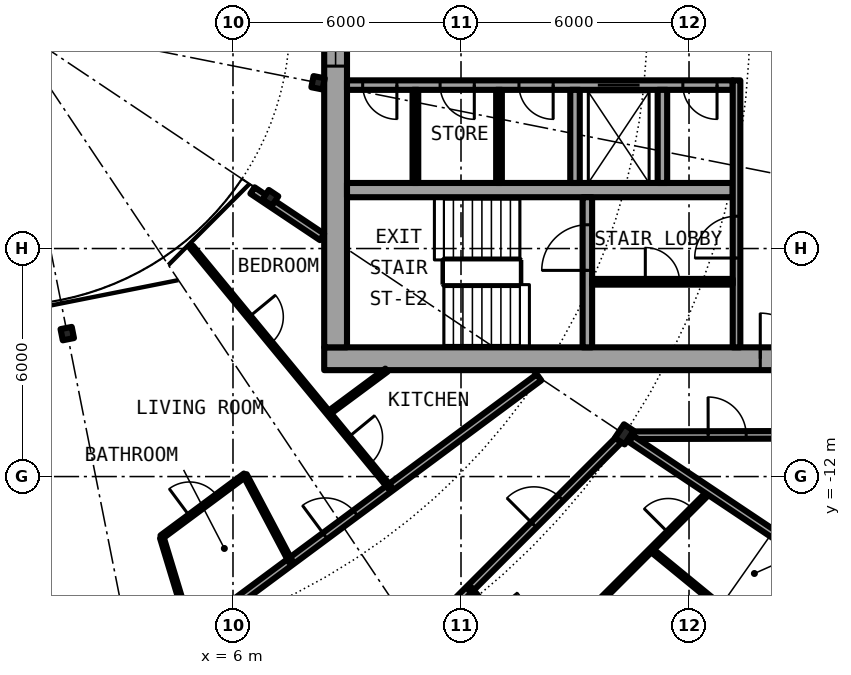
"""IFC4 building model, lengths in metres.
Left out: names, types, materials, properties, quantities, classifications, styles, units other than length and angle.
Written with IfcOpenShell. Run it as: python <this file> out.ifc"""

import sys

from ifc_helpers import new_model, si_unit, direction, frame, frame_2d, origin, origin_2d, place, context, subcontext, project, spatial, rectangle, i_section, extrude, element, fill, save


model = new_model("IFC4")
c1 = context("Model", 3, precision=1e-05, world=origin(), true_north=direction((0.0, 1.0)))
c2 = subcontext(c1, "Body", "Model", "MODEL_VIEW")
j1 = project(units=[si_unit("LENGTHUNIT", "METRE"), si_unit("PLANEANGLEUNIT", "RADIAN")], contexts=[c1])
p1 = place(None, origin())
s1 = spatial("IfcSite", under=j1, at=p1, CompositionType="ELEMENT")
p2 = place(p1, origin())
s2 = spatial("IfcBuilding", under=s1, at=p2, CompositionType="ELEMENT")
p3 = place(p2, frame((0.0, 0.0, 120.8)))
s3 = spatial("IfcBuildingStorey", under=s2, at=p3, CompositionType="ELEMENT", Elevation=120.8)
p4 = place(p3, frame((16.297, -10.889, 0.0), z_axis=(0.0, 0.0, 1.0), x_axis=(0.831469612303, -0.55557023302, 0.0)))
e1 = element("IfcColumn", 1, at=p4, inside=s3, PredefinedType="COLUMN", context=c2, shape_type="SweptSolid", body=[
    extrude(i_section(OverallWidth=0.307, OverallDepth=0.432, WebThickness=0.021, FlangeThickness=0.04, FilletRadius=0.027, at=origin_2d()), origin(), (0.0, 0.0, 1.0), 3.05),
])
for number, where, z_axis, x_axis in (
    (2, (1.639, -8.239, 0.0), (0.0, 0.0, 1.0), (0.195, -0.981, 0.0)),
    (3, (6.984, -4.667, 0.0), (0.0, 0.0, 1.0), (0.831, -0.556, 0.0)),
    (4, (8.239, -1.639, 0.0), (0.0, 0.0, 1.0), (0.981, -0.195, 0.0)),
):
    element("IfcColumn", number, at=place(p3, frame(where, z_axis=z_axis, x_axis=x_axis)), inside=s3, PredefinedType="COLUMN", context=c2, shape_type="SweptSolid", body=[
        extrude(i_section(OverallWidth=0.3, OverallDepth=0.3, WebThickness=0.011, FlangeThickness=0.019, FilletRadius=0.027, at=origin_2d()), origin(), (0.0, 0.0, 1.0), 3.05),
    ])
p5 = place(p3, frame((19.304, -19.304, 0.0), z_axis=(0.0, 0.0, 1.0), x_axis=(0.634382322723, 0.773019449054, 0.0)))
e5 = element("IfcWall", 5, at=p5, inside=s3, PredefinedType="SOLIDWALL", context=c2, shape_type="SweptSolid", body=[
    extrude(rectangle(XDim=5.352, YDim=0.25, at=frame_2d((2.676, 0.0))), origin(), (0.0, 0.0, 1.0), 2.7),
])
p6 = place(p5, frame((0.841, 0.0, 0.0)))
e6 = element("IfcOpeningElement", 6, at=p6, cuts=e5, PredefinedType="OPENING", context=c2, shape_type="SweptSolid", body=[
    extrude(rectangle(XDim=1.0, YDim=2.2, at=frame_2d((0.5, 1.1))), frame((0.0, 0.135, 0.0), z_axis=(0.0, -1.0, 0.0), x_axis=(1.0, 0.0, 0.0)), (0.0, 0.0, 1.0), 0.27),
])
p7 = place(p5, frame((3.111, 0.0, 0.3)))
e7 = element("IfcOpeningElement", 7, at=p7, cuts=e5, PredefinedType="OPENING", context=c2, shape_type="SweptSolid", body=[
    extrude(rectangle(XDim=1.8, YDim=2.1, at=frame_2d((0.9, 1.05))), frame((0.0, 0.135, 0.0), z_axis=(0.0, -1.0, 0.0), x_axis=(1.0, 0.0, 0.0)), (0.0, 0.0, 1.0), 0.27),
])
p8 = place(p3, frame((8.4, -8.9, 0.0), z_axis=(0.0, 0.0, 1.0), x_axis=(1.0, 0.0, 0.0)))
e8 = element("IfcWall", 8, at=p8, inside=s3, PredefinedType="SHEAR", context=c2, shape_type="SweptSolid", body=[
    extrude(rectangle(XDim=13.8, YDim=0.6, at=frame_2d((6.9, 0.0))), origin(), (0.0, 0.0, 1.0), 3.05),
])
p9 = place(p8, frame((11.475, 0.0, 0.0)))
e9 = element("IfcOpeningElement", 9, at=p9, cuts=e8, PredefinedType="OPENING", context=c2, shape_type="SweptSolid", body=[
    extrude(rectangle(XDim=1.2, YDim=2.3, at=frame_2d((0.6, 1.15))), frame((0.0, 0.31, 0.0), z_axis=(0.0, -1.0, 0.0), x_axis=(1.0, 0.0, 0.0)), (0.0, 0.0, 1.0), 0.62),
])
p10 = place(p3, frame((8.7, -8.6, 0.0), z_axis=(0.0, 0.0, 1.0), x_axis=(0.0, 1.0, 0.0)))
e10 = element("IfcWall", 10, at=p10, inside=s3, PredefinedType="SHEAR", context=c2, shape_type="SweptSolid", body=[
    extrude(rectangle(XDim=17.2, YDim=0.6, at=frame_2d((8.6, 0.0))), origin(), (0.0, 0.0, 1.0), 3.05),
])
p11 = place(p10, frame((7.4, 0.0, 0.1)))
e11 = element("IfcOpeningElement", 11, at=p11, cuts=e10, PredefinedType="OPENING", context=c2, shape_type="SweptSolid", body=[
    extrude(rectangle(XDim=2.4, YDim=2.2, at=frame_2d((1.2, 1.1))), frame((0.0, 0.31, 0.0), z_axis=(0.0, -1.0, 0.0), x_axis=(1.0, 0.0, 0.0)), (0.0, 0.0, 1.0), 0.62),
])
p12 = place(p3, frame((19.15, -1.7, 0.0), z_axis=(0.0, 0.0, 1.0), x_axis=(-1.0, 0.0, 0.0)))
e12 = element("IfcWall", 12, at=p12, inside=s3, PredefinedType="SHEAR", context=c2, shape_type="SweptSolid", body=[
    extrude(rectangle(XDim=10.15, YDim=0.25, at=frame_2d((5.075, 0.0))), origin(), (0.0, 0.0, 1.0), 3.05),
])
p13 = place(p12, frame((2.45, 0.0, 0.0)))
e13 = element("IfcOpeningElement", 13, at=p13, cuts=e12, PredefinedType="OPENING", context=c2, shape_type="SweptSolid", body=[
    extrude(rectangle(XDim=1.1, YDim=2.3, at=frame_2d((0.55, 1.15))), frame((0.0, 0.135, 0.0), z_axis=(0.0, -1.0, 0.0), x_axis=(1.0, 0.0, 0.0)), (0.0, 0.0, 1.0), 0.27),
])
p14 = place(p12, frame((8.837, 0.0, 0.0)))
e14 = element("IfcOpeningElement", 14, at=p14, cuts=e12, PredefinedType="OPENING", context=c2, shape_type="SweptSolid", body=[
    extrude(rectangle(XDim=0.9, YDim=2.3, at=frame_2d((0.45, 1.15))), frame((0.0, 0.135, 0.0), z_axis=(0.0, -1.0, 0.0), x_axis=(1.0, 0.0, 0.0)), (0.0, 0.0, 1.0), 0.27),
])
p15 = place(p12, frame((6.8, 0.0, 0.0)))
e15 = element("IfcOpeningElement", 15, at=p15, cuts=e12, PredefinedType="OPENING", context=c2, shape_type="SweptSolid", body=[
    extrude(rectangle(XDim=0.9, YDim=2.3, at=frame_2d((0.45, 1.15))), frame((0.0, 0.135, 0.0), z_axis=(0.0, -1.0, 0.0), x_axis=(1.0, 0.0, 0.0)), (0.0, 0.0, 1.0), 0.27),
])
p16 = place(p12, frame((4.725, 0.0, 0.0)))
e16 = element("IfcOpeningElement", 16, at=p16, cuts=e12, PredefinedType="OPENING", context=c2, shape_type="SweptSolid", body=[
    extrude(rectangle(XDim=0.9, YDim=2.3, at=frame_2d((0.45, 1.15))), frame((0.0, 0.135, 0.0), z_axis=(0.0, -1.0, 0.0), x_axis=(1.0, 0.0, 0.0)), (0.0, 0.0, 1.0), 0.27),
])
p17 = place(p12, frame((0.413, 0.0, 0.0)))
e17 = element("IfcOpeningElement", 17, at=p17, cuts=e12, PredefinedType="OPENING", context=c2, shape_type="SweptSolid", body=[
    extrude(rectangle(XDim=0.9, YDim=2.3, at=frame_2d((0.45, 1.15))), frame((0.0, 0.135, 0.0), z_axis=(0.0, -1.0, 0.0), x_axis=(1.0, 0.0, 0.0)), (0.0, 0.0, 1.0), 0.27),
])
p18 = place(p3, frame((9.0, -4.462, 0.0), z_axis=(0.0, 0.0, 1.0), x_axis=(1.0, 0.0, 0.0)))
e18 = element("IfcWall", 18, at=p18, inside=s3, PredefinedType="SHEAR", context=c2, shape_type="SweptSolid", body=[
    extrude(rectangle(XDim=10.15, YDim=0.375, at=frame_2d((5.075, 0.0))), origin(), (0.0, 0.0, 1.0), 3.05),
])
p19 = place(p3, frame((15.325, -8.6, 0.0), z_axis=(0.0, 0.0, 1.0), x_axis=(0.0, 1.0, 0.0)))
e19 = element("IfcWall", 19, at=p19, inside=s3, PredefinedType="SHEAR", context=c2, shape_type="SweptSolid", body=[
    extrude(rectangle(XDim=3.95, YDim=0.25, at=frame_2d((1.975, 0.0))), origin(), (0.0, 0.0, 1.0), 3.05),
])
p20 = place(p19, frame((2.025, 0.0, 0.0)))
e20 = element("IfcOpeningElement", 20, at=p20, cuts=e19, PredefinedType="OPENING", context=c2, shape_type="SweptSolid", body=[
    extrude(rectangle(XDim=1.2, YDim=2.3, at=frame_2d((0.6, 1.15))), frame((0.0, 0.135, 0.0), z_axis=(0.0, -1.0, 0.0), x_axis=(1.0, 0.0, 0.0)), (0.0, 0.0, 1.0), 0.27),
])
for number, where, z_axis, x_axis in (
    (21, (15.0, -1.825, 0.0), (0.0, 0.0, 1.0), (0.0, -1.0, 0.0)),
    (22, (17.3, -1.825, 0.0), (0.0, 0.0, 1.0), (0.0, -1.0, 0.0)),
):
    element("IfcWall", number, at=place(p3, frame(where, z_axis=z_axis, x_axis=x_axis)), inside=s3, PredefinedType="SOLIDWALL", context=c2, shape_type="SweptSolid", body=[
        extrude(rectangle(XDim=2.45, YDim=0.25, at=frame_2d((1.225, 0.0))), origin(), (0.0, 0.0, 1.0), 2.7),
    ])
p21 = place(p3, frame((19.25, -8.6, 0.0), z_axis=(0.0, 0.0, 1.0), x_axis=(0.0, 1.0, 0.0)))
e23 = element("IfcWall", 23, at=p21, inside=s3, PredefinedType="SOLIDWALL", context=c2, shape_type="SweptSolid", body=[
    extrude(rectangle(XDim=7.025, YDim=0.2, at=frame_2d((3.513, 0.0))), origin(), (0.0, 0.0, 1.0), 2.7),
])
p22 = place(p21, frame((2.35, 0.0, 0.0)))
e24 = element("IfcOpeningElement", 24, at=p22, cuts=e23, PredefinedType="OPENING", context=c2, shape_type="SweptSolid", body=[
    extrude(rectangle(XDim=1.1, YDim=2.3, at=frame_2d((0.55, 1.15))), frame((0.0, 0.11, 0.0), z_axis=(0.0, -1.0, 0.0), x_axis=(1.0, 0.0, 0.0)), (0.0, 0.0, 1.0), 0.22),
])
for number, where, z_axis, x_axis in (
    (25, (10.8, -1.825, 0.0), (0.0, 0.0, 1.0), (0.0, -1.0, 0.0)),
    (26, (13.0, -1.825, 0.0), (0.0, 0.0, 1.0), (0.0, -1.0, 0.0)),
):
    element("IfcWall", number, at=place(p3, frame(where, z_axis=z_axis, x_axis=x_axis)), inside=s3, PredefinedType="PARTITIONING", context=c2, shape_type="SweptSolid", body=[
        extrude(rectangle(XDim=2.45, YDim=0.15, at=frame_2d((1.225, 0.0))), origin(), (0.0, 0.0, 1.0), 2.7),
    ])
p23 = place(p3, frame((15.45, -6.875, 0.0), z_axis=(0.0, 0.0, 1.0), x_axis=(1.0, 0.0, 0.0)))
e27 = element("IfcWall", 27, at=p23, inside=s3, PredefinedType="PARTITIONING", context=c2, shape_type="SweptSolid", body=[
    extrude(rectangle(XDim=3.7, YDim=0.15, at=frame_2d((1.85, 0.0))), origin(), (0.0, 0.0, 1.0), 2.7),
])
p24 = place(p23, frame((1.4, 0.0, 0.0)))
e28 = element("IfcOpeningElement", 28, at=p24, cuts=e27, PredefinedType="OPENING", context=c2, shape_type="SweptSolid", body=[
    extrude(rectangle(XDim=0.9, YDim=2.3, at=frame_2d((0.45, 1.15))), frame((0.0, 0.085, 0.0), z_axis=(0.0, -1.0, 0.0), x_axis=(1.0, 0.0, 0.0)), (0.0, 0.0, 1.0), 0.17),
])
p25 = place(p3, frame((15.468, -15.463, 0.0), z_axis=(0.0, 0.0, 1.0), x_axis=(0.707106781187, 0.707106781187, 0.0)))
e29 = element("IfcWall", 29, at=p25, inside=s3, PredefinedType="PARTITIONING", context=c2, shape_type="SweptSolid", body=[
    extrude(rectangle(XDim=4.351, YDim=0.1, at=frame_2d((2.176, 0.0))), origin(), (0.0, 0.0, 1.0), 2.7),
])
p26 = place(p25, frame((2.808, 0.0, 0.0)))
e30 = element("IfcOpeningElement", 30, at=p26, cuts=e29, PredefinedType="OPENING", context=c2, shape_type="SweptSolid", body=[
    extrude(rectangle(XDim=0.9, YDim=2.3, at=frame_2d((0.45, 1.15))), frame((0.0, 0.06, 0.0), z_axis=(0.0, -1.0, 0.0), x_axis=(1.0, 0.0, 0.0)), (0.0, 0.0, 1.0), 0.12),
])
p27 = place(p3, frame((11.0, -16.186, 0.0), z_axis=(0.0, 0.0, 1.0), x_axis=(0.707106781187, 0.707106781187, 0.0)))
e31 = element("IfcWall", 31, at=p27, inside=s3, PredefinedType="PARTITIONING", context=c2, shape_type="SweptSolid", body=[
    extrude(rectangle(XDim=7.334, YDim=0.2, at=frame_2d((3.667, 0.0))), origin(), (0.0, 0.0, 1.0), 2.39),
])
p28 = place(p27, frame((4.123, 0.0, 0.0)))
e32 = element("IfcOpeningElement", 32, at=p28, cuts=e31, PredefinedType="OPENING", context=c2, shape_type="SweptSolid", body=[
    extrude(rectangle(XDim=1.0, YDim=2.3, at=frame_2d((0.5, 1.15))), frame((0.0, 0.11, 0.0), z_axis=(0.0, -1.0, 0.0), x_axis=(1.0, 0.0, 0.0)), (0.0, 0.0, 1.0), 0.22),
])
p29 = place(p3, frame((4.906, -16.172, 0.0), z_axis=(0.0, 0.0, 1.0), x_axis=(0.803204584823, 0.59570327758, 0.0)))
e33 = element("IfcWall", 33, at=p29, inside=s3, PredefinedType="PARTITIONING", context=c2, shape_type="SweptSolid", body=[
    extrude(rectangle(XDim=11.387, YDim=0.2, at=frame_2d((5.693, 0.0))), origin(), (0.0, 0.0, 1.0), 2.7),
])
p30 = place(p29, frame((4.38, 0.0, 0.0)))
e34 = element("IfcOpeningElement", 34, at=p30, cuts=e33, PredefinedType="OPENING", context=c2, shape_type="SweptSolid", body=[
    extrude(rectangle(XDim=1.0, YDim=2.3, at=frame_2d((0.5, 1.15))), frame((0.0, 0.11, 0.0), z_axis=(0.0, -1.0, 0.0), x_axis=(1.0, 0.0, 0.0)), (0.0, 0.0, 1.0), 0.22),
])
p31 = place(p3, frame((4.122, -13.589, 0.0), z_axis=(0.0, 0.0, 1.0), x_axis=(0.803128348509, 0.595806055542, 0.0)))
e35 = element("IfcWall", 35, at=p31, inside=s3, PredefinedType="PARTITIONING", context=c2, shape_type="SweptSolid", body=[
    extrude(rectangle(XDim=2.734, YDim=0.1, at=frame_2d((1.367, 0.0))), origin(), (0.0, 0.0, 1.0), 2.7),
])
p32 = place(p31, frame((0.917, 0.0, 0.0)))
e36 = element("IfcOpeningElement", 36, at=p32, cuts=e35, PredefinedType="OPENING", context=c2, shape_type="SweptSolid", body=[
    extrude(rectangle(XDim=0.9, YDim=2.3, at=frame_2d((0.45, 1.15))), frame((0.0, 0.06, 0.0), z_axis=(0.0, -1.0, 0.0), x_axis=(1.0, 0.0, 0.0)), (0.0, 0.0, 1.0), 0.12),
])
p33 = place(p3, frame((8.513, -10.332, 0.0), z_axis=(0.0, 0.0, 1.0), x_axis=(0.803149591038, 0.595777420196, 0.0)))
e37 = element("IfcWall", 37, at=p33, inside=s3, PredefinedType="PARTITIONING", context=c2, shape_type="SweptSolid", body=[
    extrude(rectangle(XDim=1.9, YDim=0.1, at=frame_2d((0.95, 0.0))), origin(), (0.0, 0.0, 1.0), 2.7),
])
p34 = place(p3, frame((16.541, -10.912, 0.0), z_axis=(0.0, 0.0, 1.0), x_axis=(0.999997173357, 0.002377662213, 0.0)))
e38 = element("IfcWall", 38, at=p34, inside=s3, PredefinedType="PARTITIONING", context=c2, shape_type="SweptSolid", body=[
    extrude(rectangle(XDim=5.134, YDim=0.2, at=frame_2d((2.567, 0.0))), origin(), (0.0, 0.0, 1.0), 2.7),
])
p35 = place(p34, frame((1.963, 0.0, 0.0)))
e39 = element("IfcOpeningElement", 39, at=p35, cuts=e38, PredefinedType="OPENING", context=c2, shape_type="SweptSolid", body=[
    extrude(rectangle(XDim=1.0, YDim=2.3, at=frame_2d((0.5, 1.15))), frame((0.0, 0.11, 0.0), z_axis=(0.0, -1.0, 0.0), x_axis=(1.0, 0.0, 0.0)), (0.0, 0.0, 1.0), 0.22),
])
p36 = place(p3, frame((6.513, -4.472, 0.0), z_axis=(0.0, 0.0, 1.0), x_axis=(0.831333375071, -0.555774072347, 0.0)))
e40 = element("IfcWall", 40, at=p36, inside=s3, PredefinedType="PARTITIONING", context=c2, shape_type="SweptSolid", body=[
    extrude(rectangle(XDim=2.203, YDim=0.2, at=frame_2d((1.101, 0.0))), origin(), (0.0, 0.0, 1.0), 2.7),
])
p37 = place(p3, frame((4.908, -5.959, 0.0), z_axis=(0.0, 0.0, 1.0), x_axis=(0.636105207978, -0.771602335652, 0.0)))
e41 = element("IfcWall", 41, at=p37, inside=s3, PredefinedType="PARTITIONING", context=c2, shape_type="SweptSolid", body=[
    extrude(rectangle(XDim=8.213, YDim=0.1, at=frame_2d((4.106, 0.0))), origin(), (0.0, 0.0, 1.0), 2.7),
])
p38 = place(p37, frame((6.49, 0.0, 0.0)))
e42 = element("IfcOpeningElement", 42, at=p38, cuts=e41, PredefinedType="OPENING", context=c2, shape_type="SweptSolid", body=[
    extrude(rectangle(XDim=0.9, YDim=2.3, at=frame_2d((0.45, 1.15))), frame((0.0, 0.06, 0.0), z_axis=(0.0, -1.0, 0.0), x_axis=(1.0, 0.0, 0.0)), (0.0, 0.0, 1.0), 0.12),
])
p39 = place(p37, frame((2.384, 0.0, 0.0)))
e43 = element("IfcOpeningElement", 43, at=p39, cuts=e41, PredefinedType="OPENING", context=c2, shape_type="SweptSolid", body=[
    extrude(rectangle(XDim=0.9, YDim=2.3, at=frame_2d((0.45, 1.15))), frame((0.0, 0.06, 0.0), z_axis=(0.0, -1.0, 0.0), x_axis=(1.0, 0.0, 0.0)), (0.0, 0.0, 1.0), 0.12),
])
p40 = place(p3, frame((6.316, -11.961, 0.0), z_axis=(0.0, 0.0, 1.0), x_axis=(0.467037016128, -0.884237765291, 0.0)))
e44 = element("IfcWall", 44, at=p40, inside=s3, PredefinedType="PARTITIONING", context=c2, shape_type="SweptSolid", body=[
    extrude(rectangle(XDim=2.572, YDim=0.1, at=frame_2d((1.286, 0.0))), origin(), (0.0, 0.0, 1.0), 2.7),
])
p41 = place(p3, frame((12.237, -14.948, 0.0), z_axis=(0.0, 0.0, 1.0), x_axis=(0.633537478353, -0.773712002958, 0.0)))
e45 = element("IfcWall", 45, at=p41, inside=s3, PredefinedType="PARTITIONING", context=c2, shape_type="SweptSolid", body=[
    extrude(rectangle(XDim=2.661, YDim=0.1, at=frame_2d((1.331, 0.0))), origin(), (0.0, 0.0, 1.0), 2.7),
])
p42 = place(p41, frame((0.881, 0.0, 0.0)))
e46 = element("IfcOpeningElement", 46, at=p42, cuts=e45, PredefinedType="OPENING", context=c2, shape_type="SweptSolid", body=[
    extrude(rectangle(XDim=0.9, YDim=2.3, at=frame_2d((0.45, 1.15))), frame((0.0, 0.06, 0.0), z_axis=(0.0, -1.0, 0.0), x_axis=(1.0, 0.0, 0.0)), (0.0, 0.0, 1.0), 0.12),
])
p43 = place(p3, frame((16.477, -11.009, 0.0), z_axis=(0.0, 0.0, 1.0), x_axis=(0.831467903109, -0.555572791, 0.0)))
e47 = element("IfcWall", 47, at=p43, inside=s3, PredefinedType="PARTITIONING", context=c2, shape_type="SweptSolid", body=[
    extrude(rectangle(XDim=7.358, YDim=0.2, at=frame_2d((3.679, 0.0))), origin(), (0.0, 0.0, 1.0), 2.7),
])
p44 = place(p3, frame((17.004, -13.927, 0.0), z_axis=(0.0, 0.0, 1.0), x_axis=(0.773517471898, -0.633774976367, 0.0)))
e48 = element("IfcWall", 48, at=p44, inside=s3, PredefinedType="PARTITIONING", context=c2, shape_type="SweptSolid", body=[
    extrude(rectangle(XDim=5.196, YDim=0.1, at=frame_2d((2.598, 0.0))), origin(), (0.0, 0.0, 1.0), 2.7),
])
p45 = place(p3, frame((4.9, -16.152, 0.0), z_axis=(0.0, 0.0, 1.0), x_axis=(-0.290456070925, 0.956888327269, 0.0)))
e49 = element("IfcWall", 49, at=p45, inside=s3, PredefinedType="PARTITIONING", context=c2, shape_type="SweptSolid", body=[
    extrude(rectangle(XDim=2.658, YDim=0.1, at=frame_2d((1.329, 0.0))), origin(), (0.0, 0.0, 1.0), 2.7),
])
p46 = place(p13, origin())
e50 = element("IfcDoor", 50, at=p46, inside=s3, OperationType="DOUBLE_DOOR_SLIDING", PredefinedType="DOOR", context=c2, shape_type="SweptSolid", body=[
    extrude(rectangle(XDim=1.1, YDim=2.3, at=frame_2d((0.55, 1.15))), frame((0.0, 0.025, 0.0), z_axis=(0.0, -1.0, 0.0), x_axis=(1.0, 0.0, 0.0)), (0.0, 0.0, 1.0), 0.05),
])
fill(e13, e50)
p47 = place(p14, origin())
e51 = element("IfcDoor", 51, at=p47, inside=s3, OperationType="SINGLE_SWING_LEFT", PredefinedType="DOOR", context=c2, shape_type="SweptSolid", body=[
    extrude(rectangle(XDim=0.9, YDim=2.3, at=frame_2d((0.45, 1.15))), frame((0.0, 0.025, 0.0), z_axis=(0.0, -1.0, 0.0), x_axis=(1.0, 0.0, 0.0)), (0.0, 0.0, 1.0), 0.05),
])
fill(e14, e51)
p48 = place(p15, origin())
e52 = element("IfcDoor", 52, at=p48, inside=s3, OperationType="SINGLE_SWING_LEFT", PredefinedType="DOOR", context=c2, shape_type="SweptSolid", body=[
    extrude(rectangle(XDim=0.9, YDim=2.3, at=frame_2d((0.45, 1.15))), frame((0.0, 0.025, 0.0), z_axis=(0.0, -1.0, 0.0), x_axis=(1.0, 0.0, 0.0)), (0.0, 0.0, 1.0), 0.05),
])
fill(e15, e52)
p49 = place(p16, origin())
e53 = element("IfcDoor", 53, at=p49, inside=s3, OperationType="SINGLE_SWING_LEFT", PredefinedType="DOOR", context=c2, shape_type="SweptSolid", body=[
    extrude(rectangle(XDim=0.9, YDim=2.3, at=frame_2d((0.45, 1.15))), frame((0.0, 0.025, 0.0), z_axis=(0.0, -1.0, 0.0), x_axis=(1.0, 0.0, 0.0)), (0.0, 0.0, 1.0), 0.05),
])
fill(e16, e53)
p50 = place(p17, origin())
e54 = element("IfcDoor", 54, at=p50, inside=s3, OperationType="SINGLE_SWING_RIGHT", PredefinedType="DOOR", context=c2, shape_type="SweptSolid", body=[
    extrude(rectangle(XDim=0.9, YDim=2.3, at=frame_2d((0.45, 1.15))), frame((0.0, 0.025, 0.0), z_axis=(0.0, -1.0, 0.0), x_axis=(1.0, 0.0, 0.0)), (0.0, 0.0, 1.0), 0.05),
])
fill(e17, e54)
p51 = place(p24, origin())
e55 = element("IfcDoor", 55, at=p51, inside=s3, OperationType="SINGLE_SWING_LEFT", PredefinedType="DOOR", context=c2, shape_type="SweptSolid", body=[
    extrude(rectangle(XDim=0.9, YDim=2.3, at=frame_2d((0.45, 1.15))), frame((0.0, 0.025, 0.0), z_axis=(0.0, -1.0, 0.0), x_axis=(1.0, 0.0, 0.0)), (0.0, 0.0, 1.0), 0.05),
])
fill(e28, e55)
p52 = place(p20, origin())
e56 = element("IfcDoor", 56, at=p52, inside=s3, OperationType="SINGLE_SWING_LEFT", PredefinedType="DOOR", context=c2, shape_type="SweptSolid", body=[
    extrude(rectangle(XDim=1.2, YDim=2.3, at=frame_2d((0.6, 1.15))), frame((0.0, 0.025, 0.0), z_axis=(0.0, -1.0, 0.0), x_axis=(1.0, 0.0, 0.0)), (0.0, 0.0, 1.0), 0.05),
])
fill(e20, e56)
p53 = place(p22, origin())
e57 = element("IfcDoor", 57, at=p53, inside=s3, OperationType="SINGLE_SWING_RIGHT", PredefinedType="DOOR", context=c2, shape_type="SweptSolid", body=[
    extrude(rectangle(XDim=1.1, YDim=2.3, at=frame_2d((0.55, 1.15))), frame((0.0, 0.025, 0.0), z_axis=(0.0, -1.0, 0.0), x_axis=(1.0, 0.0, 0.0)), (0.0, 0.0, 1.0), 0.05),
])
fill(e24, e57)
p54 = place(p9, origin())
e58 = element("IfcDoor", 58, at=p54, inside=s3, OperationType="SINGLE_SWING_LEFT", PredefinedType="DOOR", context=c2, shape_type="SweptSolid", body=[
    extrude(rectangle(XDim=1.2, YDim=2.3, at=frame_2d((0.6, 1.15))), frame((0.0, 0.025, 0.0), z_axis=(0.0, -1.0, 0.0), x_axis=(1.0, 0.0, 0.0)), (0.0, 0.0, 1.0), 0.05),
])
fill(e9, e58)
p55 = place(p11, origin())
e59 = element("IfcWindow", 59, at=p55, inside=s3, PartitioningType="SINGLE_PANEL", PredefinedType="WINDOW", context=c2, shape_type="SweptSolid", body=[
    extrude(rectangle(XDim=2.4, YDim=2.2, at=frame_2d((1.2, 1.1))), frame((0.0, 0.03, 0.0), z_axis=(0.0, -1.0, 0.0), x_axis=(1.0, 0.0, 0.0)), (0.0, 0.0, 1.0), 0.06),
])
fill(e11, e59)
p56 = place(p28, origin())
e60 = element("IfcDoor", 60, at=p56, inside=s3, OperationType="SINGLE_SWING_RIGHT", PredefinedType="DOOR", context=c2, shape_type="SweptSolid", body=[
    extrude(rectangle(XDim=1.0, YDim=2.3, at=frame_2d((0.5, 1.15))), frame((0.0, 0.025, 0.0), z_axis=(0.0, -1.0, 0.0), x_axis=(1.0, 0.0, 0.0)), (0.0, 0.0, 1.0), 0.05),
])
fill(e32, e60)
p57 = place(p26, origin())
e61 = element("IfcDoor", 61, at=p57, inside=s3, OperationType="SINGLE_SWING_RIGHT", PredefinedType="DOOR", context=c2, shape_type="SweptSolid", body=[
    extrude(rectangle(XDim=0.9, YDim=2.3, at=frame_2d((0.45, 1.15))), frame((0.0, 0.025, 0.0), z_axis=(0.0, -1.0, 0.0), x_axis=(1.0, 0.0, 0.0)), (0.0, 0.0, 1.0), 0.05),
])
fill(e30, e61)
p58 = place(p30, origin())
e62 = element("IfcDoor", 62, at=p58, inside=s3, OperationType="SINGLE_SWING_LEFT", PredefinedType="DOOR", context=c2, shape_type="SweptSolid", body=[
    extrude(rectangle(XDim=1.0, YDim=2.3, at=frame_2d((0.5, 1.15))), frame((0.0, 0.025, 0.0), z_axis=(0.0, -1.0, 0.0), x_axis=(1.0, 0.0, 0.0)), (0.0, 0.0, 1.0), 0.05),
])
fill(e34, e62)
p59 = place(p32, origin())
e63 = element("IfcDoor", 63, at=p59, inside=s3, OperationType="SINGLE_SWING_RIGHT", PredefinedType="DOOR", context=c2, shape_type="SweptSolid", body=[
    extrude(rectangle(XDim=0.9, YDim=2.3, at=frame_2d((0.45, 1.15))), frame((0.0, 0.025, 0.0), z_axis=(0.0, -1.0, 0.0), x_axis=(1.0, 0.0, 0.0)), (0.0, 0.0, 1.0), 0.05),
])
fill(e36, e63)
p60 = place(p38, origin())
e64 = element("IfcDoor", 64, at=p60, inside=s3, OperationType="SINGLE_SWING_RIGHT", PredefinedType="DOOR", context=c2, shape_type="SweptSolid", body=[
    extrude(rectangle(XDim=0.9, YDim=2.3, at=frame_2d((0.45, 1.15))), frame((0.0, 0.025, 0.0), z_axis=(0.0, -1.0, 0.0), x_axis=(1.0, 0.0, 0.0)), (0.0, 0.0, 1.0), 0.05),
])
fill(e42, e64)
p61 = place(p39, origin())
e65 = element("IfcDoor", 65, at=p61, inside=s3, OperationType="SINGLE_SWING_LEFT", PredefinedType="DOOR", context=c2, shape_type="SweptSolid", body=[
    extrude(rectangle(XDim=0.9, YDim=2.3, at=frame_2d((0.45, 1.15))), frame((0.0, 0.025, 0.0), z_axis=(0.0, -1.0, 0.0), x_axis=(1.0, 0.0, 0.0)), (0.0, 0.0, 1.0), 0.05),
])
fill(e43, e65)
p62 = place(p35, origin())
e66 = element("IfcDoor", 66, at=p62, inside=s3, OperationType="SINGLE_SWING_LEFT", PredefinedType="DOOR", context=c2, shape_type="SweptSolid", body=[
    extrude(rectangle(XDim=1.0, YDim=2.3, at=frame_2d((0.5, 1.15))), frame((0.0, 0.025, 0.0), z_axis=(0.0, -1.0, 0.0), x_axis=(1.0, 0.0, 0.0)), (0.0, 0.0, 1.0), 0.05),
])
fill(e39, e66)
save(model, sys.argv[1])
